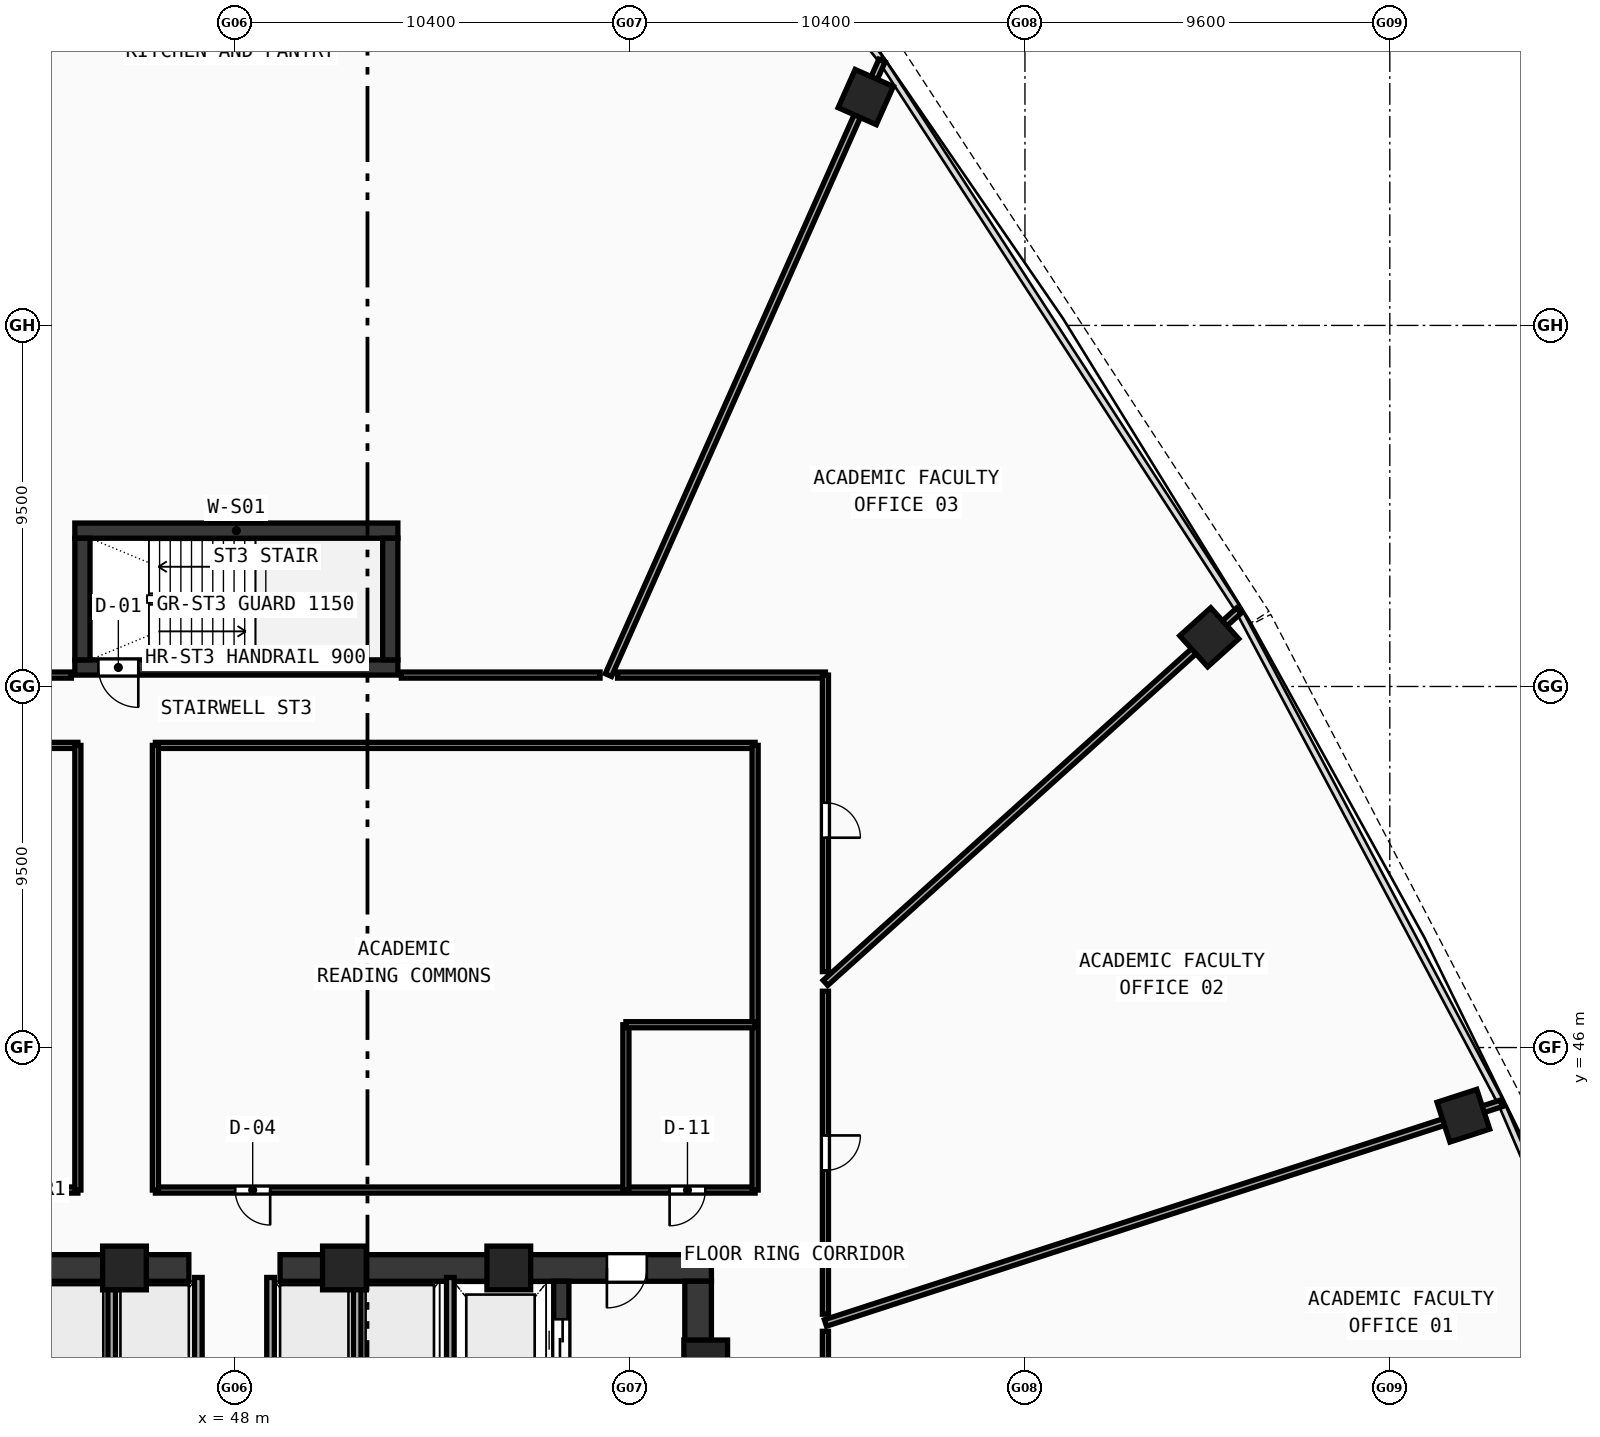
"""IFC4 building model, lengths in metres.
Left out: names, types, materials, properties, quantities, classifications, styles, units other than length and angle.
Written with IfcOpenShell. Run it as: python <this file> out.ifc"""

import sys

from ifc_helpers import new_model, si_unit, direction, frame, frame_2d, origin, origin_with_axes, origin_2d, place, context, subcontext, project, spatial, rectangle, hollow_rectangle, extrude, source, transform, mapped, element, fill, save


model = new_model("IFC4")
c1 = context("Model", 3, precision=1e-05, world=origin(), true_north=direction((0.0, 1.0)))
c2 = subcontext(c1, "Body", "Model", "MODEL_VIEW")
j1 = project(units=[si_unit("LENGTHUNIT", "METRE"), si_unit("PLANEANGLEUNIT", "RADIAN")], contexts=[c1])
p1 = place(None, origin())
s1 = spatial("IfcSite", under=j1, at=p1, CompositionType="ELEMENT")
p2 = place(p1, origin())
s2 = spatial("IfcBuilding", under=s1, at=p2, CompositionType="ELEMENT")
p3 = place(p2, frame((0.0, 0.0, 63.07)))
s3 = spatial("IfcBuildingStorey", under=s2, at=p3, CompositionType="ELEMENT", Elevation=63.07)
p4 = place(p3, frame((35.45, 40.2, 0.0), z_axis=(0.0, 0.0, 1.0), x_axis=(1.0, 0.0, 0.0)))
e1 = element("IfcWall", 1, at=p4, inside=s3, PredefinedType="SHEAR", context=c2, shape_type="SweptSolid", body=[
    extrude(rectangle(XDim=11.35, YDim=0.7, at=frame_2d((5.675, 0.0))), origin(), (0.0, 0.0, 1.0), 3.37),
])
p5 = place(p4, frame((1.7, 0.0, 0.0)))
e2 = element("IfcOpeningElement", 2, at=p5, cuts=e1, PredefinedType="OPENING", context=c2, shape_type="SweptSolid", body=[
    extrude(rectangle(XDim=1.05, YDim=2.1, at=frame_2d((0.525, 1.05))), frame((0.0, 0.36, 0.0), z_axis=(0.0, -1.0, 0.0), x_axis=(1.0, 0.0, 0.0)), (0.0, 0.0, 1.0), 0.72),
])
p6 = place(p3, frame((49.2, 40.2, 0.0), z_axis=(0.0, 0.0, 1.0), x_axis=(1.0, 0.0, 0.0)))
e3 = element("IfcWall", 3, at=p6, inside=s3, PredefinedType="SHEAR", context=c2, shape_type="SweptSolid", body=[
    extrude(rectangle(XDim=11.35, YDim=0.7, at=frame_2d((5.675, 0.0))), origin(), (0.0, 0.0, 1.0), 3.37),
])
p7 = place(p6, frame((8.6, 0.0, 0.0)))
e4 = element("IfcOpeningElement", 4, at=p7, cuts=e3, PredefinedType="OPENING", context=c2, shape_type="SweptSolid", body=[
    extrude(rectangle(XDim=1.05, YDim=2.1, at=frame_2d((0.525, 1.05))), frame((0.0, 0.36, 0.0), z_axis=(0.0, -1.0, 0.0), x_axis=(1.0, 0.0, 0.0)), (0.0, 0.0, 1.0), 0.72),
])
p8 = place(p3, frame((60.2, 27.85, 0.0), z_axis=(0.0, 0.0, 1.0), x_axis=(0.0, 1.0, 0.0)))
e5 = element("IfcWall", 5, at=p8, inside=s3, PredefinedType="SHEAR", context=c2, shape_type="SweptSolid", body=[
    extrude(rectangle(XDim=12.0, YDim=0.7, at=frame_2d((6.0, 0.0))), origin(), (0.0, 0.0, 1.0), 3.37),
])
p9 = place(p3, frame((56.6, 27.85, 0.0), z_axis=(0.0, 0.0, 1.0), x_axis=(0.0, 1.0, 0.0)))
e6 = element("IfcWall", 6, at=p9, inside=s3, PredefinedType="SHEAR", context=c2, shape_type="SweptSolid", body=[
    extrude(rectangle(XDim=12.0, YDim=0.4, at=frame_2d((6.0, 0.0))), origin(), (0.0, 0.0, 1.0), 3.37),
])
p10 = place(p9, frame((9.9, 0.0, 0.0)))
e7 = element("IfcOpeningElement", 7, at=p10, cuts=e6, PredefinedType="OPENING", context=c2, shape_type="SweptSolid", body=[
    extrude(rectangle(XDim=1.1, YDim=2.1, at=frame_2d((0.55, 1.05))), frame((0.0, 0.21, 0.0), z_axis=(0.0, -1.0, 0.0), x_axis=(1.0, 0.0, 0.0)), (0.0, 0.0, 1.0), 0.42),
])
p11 = place(p3, frame((43.8, 59.6, 0.0), z_axis=(0.0, 0.0, 1.0), x_axis=(1.0, 0.0, 0.0)))
e8 = element("IfcWall", 8, at=p11, inside=s3, PredefinedType="SHEAR", context=c2, shape_type="SweptSolid", body=[
    extrude(rectangle(XDim=8.5, YDim=0.4, at=frame_2d((4.25, 0.0))), origin(), (0.0, 0.0, 1.0), 3.37),
])
p12 = place(p3, frame((43.8, 56.0, 0.0), z_axis=(0.0, 0.0, 1.0), x_axis=(1.0, 0.0, 0.0)))
e9 = element("IfcWall", 9, at=p12, inside=s3, PredefinedType="SHEAR", context=c2, shape_type="SweptSolid", body=[
    extrude(rectangle(XDim=8.5, YDim=0.4, at=frame_2d((4.25, 0.0))), origin(), (0.0, 0.0, 1.0), 3.37),
])
p13 = place(p12, frame((0.62, 0.0, 0.0)))
e10 = element("IfcOpeningElement", 10, at=p13, cuts=e9, PredefinedType="OPENING", context=c2, shape_type="SweptSolid", body=[
    extrude(rectangle(XDim=1.05, YDim=2.1, at=frame_2d((0.525, 1.05))), frame((0.0, 0.21, 0.0), z_axis=(0.0, -1.0, 0.0), x_axis=(1.0, 0.0, 0.0)), (0.0, 0.0, 1.0), 0.42),
])
for number, where, z_axis, x_axis in (
    (11, (44.0, 56.2, 0.0), (0.0, 0.0, 1.0), (0.0, 1.0, 0.0)),
    (12, (52.1, 56.2, 0.0), (0.0, 0.0, 1.0), (0.0, 1.0, 0.0)),
):
    element("IfcWall", number, at=place(p3, frame(where, z_axis=z_axis, x_axis=x_axis)), inside=s3, PredefinedType="SHEAR", context=c2, shape_type="SweptSolid", body=[
        extrude(rectangle(XDim=3.2, YDim=0.4, at=frame_2d((1.6, 0.0))), origin(), (0.0, 0.0, 1.0), 3.37),
    ])
m1 = source(origin(), c2, "Body", "SweptSolid", [
    extrude(hollow_rectangle(XDim=1.15, YDim=1.15, WallThickness=0.048, at=origin_2d()), origin(), (0.0, 0.0, 1.0), 3.63),
])
for number, where, z_axis, x_axis in (
    (13, (60.4, 37.729, -0.26), (0.0, 0.0, 1.0), (1.0, 0.0, 0.0)),
    (14, (55.219, 40.2, -0.26), (0.0, 0.0, 1.0), (1.0, 0.0, 0.0)),
    (15, (50.894, 40.2, -0.26), (0.0, 0.0, 1.0), (1.0, 0.0, 0.0)),
    (16, (45.106, 40.2, -0.26), (0.0, 0.0, 1.0), (1.0, 0.0, 0.0)),
):
    element("IfcColumn", number, at=place(p3, frame(where, z_axis=z_axis, x_axis=x_axis)), inside=s3, PredefinedType="COLUMN", context=c2, shape_type="MappedRepresentation", body=[
        mapped(m1, transform((0.0, 0.0, 0.0), scale=1.0)),
    ])
m2 = source(origin(), c2, "Body", "SweptSolid", [
    extrude(hollow_rectangle(XDim=1.1, YDim=1.1, WallThickness=0.045, at=origin_2d()), origin(), (0.0, 0.0, 1.0), 3.63),
])
for number, where, z_axis, x_axis in (
    (17, (80.335, 44.206, -0.26), (0.0, 0.0, 1.0), (-0.309, 0.951, 0.0)),
    (18, (73.649, 56.794, -0.26), (0.0, 0.0, 1.0), (-0.669, 0.743, 0.0)),
    (19, (64.611, 71.009, -0.26), (0.0, 0.0, 1.0), (-0.914, 0.407, 0.0)),
):
    element("IfcColumn", number, at=place(p3, frame(where, z_axis=z_axis, x_axis=x_axis)), inside=s3, PredefinedType="COLUMN", context=c2, shape_type="MappedRepresentation", body=[
        mapped(m2, transform((0.0, 0.0, 0.0), scale=1.0)),
    ])
p14 = place(p3, frame((53.68, 36.65, 0.0), z_axis=(0.0, 0.0, 1.0), x_axis=(0.0, 1.0, 0.0)))
e20 = element("IfcWall", 20, at=p14, inside=s3, PredefinedType="SOLIDWALL", context=c2, shape_type="SweptSolid", body=[
    extrude(rectangle(XDim=3.3, YDim=0.2, at=frame_2d((1.65, 0.0))), origin(), (0.0, 0.0, 1.0), 3.37),
])
for number, where, z_axis, x_axis in (
    (21, (47.05, 37.32, 0.0), (0.0, 0.0, 1.0), (0.0, 1.0, 0.0)),
    (22, (48.95, 37.32, 0.0), (0.0, 0.0, 1.0), (0.0, 1.0, 0.0)),
    (23, (44.77, 37.32, 0.0), (0.0, 0.0, 1.0), (0.0, 1.0, 0.0)),
    (24, (51.23, 37.32, 0.0), (0.0, 0.0, 1.0), (0.0, 1.0, 0.0)),
):
    element("IfcWall", number, at=place(p3, frame(where, z_axis=z_axis, x_axis=x_axis)), inside=s3, PredefinedType="SOLIDWALL", context=c2, shape_type="SweptSolid", body=[
        extrude(rectangle(XDim=2.63, YDim=0.2, at=frame_2d((1.315, 0.0))), origin(), (0.0, 0.0, 1.0), 3.37),
    ])
p15 = place(p3, frame((34.95, 42.25, 0.0), z_axis=(0.0, 0.0, 1.0), x_axis=(1.0, 0.0, 0.0)))
e25 = element("IfcWall", 25, at=p15, inside=s3, PredefinedType="PARTITIONING", context=c2, shape_type="SweptSolid", body=[
    extrude(rectangle(XDim=8.93, YDim=0.16, at=frame_2d((4.465, 0.0))), origin(), (0.0, 0.0, 1.0), 2.67),
])
p16 = place(p15, frame((1.15, 0.0, 0.0)))
e26 = element("IfcOpeningElement", 26, at=p16, cuts=e25, PredefinedType="OPENING", context=c2, shape_type="SweptSolid", body=[
    extrude(rectangle(XDim=0.92, YDim=2.1, at=frame_2d((0.46, 1.05))), frame((0.0, 0.09, 0.0), z_axis=(0.0, -1.0, 0.0), x_axis=(1.0, 0.0, 0.0)), (0.0, 0.0, 1.0), 0.18),
])
p17 = place(p15, frame((4.65, 0.0, 0.0)))
e27 = element("IfcOpeningElement", 27, at=p17, cuts=e25, PredefinedType="OPENING", context=c2, shape_type="SweptSolid", body=[
    extrude(rectangle(XDim=0.92, YDim=2.1, at=frame_2d((0.46, 1.05))), frame((0.0, 0.09, 0.0), z_axis=(0.0, -1.0, 0.0), x_axis=(1.0, 0.0, 0.0)), (0.0, 0.0, 1.0), 0.18),
])
p18 = place(p3, frame((34.95, 53.95, 0.0), z_axis=(0.0, 0.0, 1.0), x_axis=(1.0, 0.0, 0.0)))
e28 = element("IfcWall", 28, at=p18, inside=s3, PredefinedType="PARTITIONING", context=c2, shape_type="SweptSolid", body=[
    extrude(rectangle(XDim=8.93, YDim=0.16, at=frame_2d((4.465, 0.0))), origin(), (0.0, 0.0, 1.0), 2.67),
])
p19 = place(p3, frame((43.88, 42.25, 0.0), z_axis=(0.0, 0.0, 1.0), x_axis=(0.0, 1.0, 0.0)))
e29 = element("IfcWall", 29, at=p19, inside=s3, PredefinedType="PARTITIONING", context=c2, shape_type="SweptSolid", body=[
    extrude(rectangle(XDim=11.7, YDim=0.16, at=frame_2d((5.85, 0.0))), origin(), (0.0, 0.0, 1.0), 2.67),
])
p20 = place(p3, frame((45.92, 42.25, 0.0), z_axis=(0.0, 0.0, 1.0), x_axis=(1.0, 0.0, 0.0)))
e30 = element("IfcWall", 30, at=p20, inside=s3, PredefinedType="PARTITIONING", context=c2, shape_type="SweptSolid", body=[
    extrude(rectangle(XDim=15.78, YDim=0.16, at=frame_2d((7.89, 0.0))), origin(), (0.0, 0.0, 1.0), 2.67),
])
p21 = place(p20, frame((2.1, 0.0, 0.0)))
e31 = element("IfcOpeningElement", 31, at=p21, cuts=e30, PredefinedType="OPENING", context=c2, shape_type="SweptSolid", body=[
    extrude(rectangle(XDim=0.92, YDim=2.1, at=frame_2d((0.46, 1.05))), frame((0.0, 0.09, 0.0), z_axis=(0.0, -1.0, 0.0), x_axis=(1.0, 0.0, 0.0)), (0.0, 0.0, 1.0), 0.18),
])
p22 = place(p20, frame((13.53, 0.0, 0.0)))
e32 = element("IfcOpeningElement", 32, at=p22, cuts=e30, PredefinedType="OPENING", context=c2, shape_type="SweptSolid", body=[
    extrude(rectangle(XDim=0.94, YDim=2.1, at=frame_2d((0.47, 1.05))), frame((0.0, 0.09, 0.0), z_axis=(0.0, -1.0, 0.0), x_axis=(1.0, 0.0, 0.0)), (0.0, 0.0, 1.0), 0.18),
])
p23 = place(p3, frame((45.92, 53.95, 0.0), z_axis=(0.0, 0.0, 1.0), x_axis=(1.0, 0.0, 0.0)))
e33 = element("IfcWall", 33, at=p23, inside=s3, PredefinedType="PARTITIONING", context=c2, shape_type="SweptSolid", body=[
    extrude(rectangle(XDim=15.78, YDim=0.16, at=frame_2d((7.89, 0.0))), origin(), (0.0, 0.0, 1.0), 2.67),
])
p24 = place(p3, frame((45.92, 42.25, 0.0), z_axis=(0.0, 0.0, 1.0), x_axis=(0.0, 1.0, 0.0)))
e34 = element("IfcWall", 34, at=p24, inside=s3, PredefinedType="PARTITIONING", context=c2, shape_type="SweptSolid", body=[
    extrude(rectangle(XDim=11.7, YDim=0.16, at=frame_2d((5.85, 0.0))), origin(), (0.0, 0.0, 1.0), 2.97),
])
p25 = place(p3, frame((61.7, 42.25, 0.0), z_axis=(0.0, 0.0, 1.0), x_axis=(0.0, 1.0, 0.0)))
e35 = element("IfcWall", 35, at=p25, inside=s3, PredefinedType="PARTITIONING", context=c2, shape_type="SweptSolid", body=[
    extrude(rectangle(XDim=11.7, YDim=0.16, at=frame_2d((5.85, 0.0))), origin(), (0.0, 0.0, 1.0), 2.67),
])
p26 = place(p3, frame((58.3, 42.25, 0.0), z_axis=(0.0, 0.0, 1.0), x_axis=(0.0, 1.0, 0.0)))
e36 = element("IfcWall", 36, at=p26, inside=s3, PredefinedType="PARTITIONING", context=c2, shape_type="SweptSolid", body=[
    extrude(rectangle(XDim=4.35, YDim=0.16, at=frame_2d((2.175, 0.0))), origin(), (0.0, 0.0, 1.0), 2.67),
])
p27 = place(p3, frame((58.3, 46.6, 0.0), z_axis=(0.0, 0.0, 1.0), x_axis=(1.0, 0.0, 0.0)))
e37 = element("IfcWall", 37, at=p27, inside=s3, PredefinedType="PARTITIONING", context=c2, shape_type="SweptSolid", body=[
    extrude(rectangle(XDim=3.4, YDim=0.16, at=frame_2d((1.7, 0.0))), origin(), (0.0, 0.0, 1.0), 2.97),
])
p28 = place(p3, frame((63.55, 38.752, 0.0), z_axis=(0.0, 0.0, 1.0), x_axis=(0.951053160417, 0.309027322514, 0.0)))
e38 = element("IfcWall", 38, at=p28, inside=s3, PredefinedType="PARTITIONING", context=c2, shape_type="SweptSolid", body=[
    extrude(rectangle(XDim=18.699, YDim=0.18, at=frame_2d((9.35, 0.0))), origin(), (0.0, 0.0, 1.0), 2.67),
])
p29 = place(p3, frame((63.55, 47.701, 0.0), z_axis=(0.0, 0.0, 1.0), x_axis=(0.743144860423, 0.669130567547, 0.0)))
e39 = element("IfcWall", 39, at=p29, inside=s3, PredefinedType="PARTITIONING", context=c2, shape_type="SweptSolid", body=[
    extrude(rectangle(XDim=14.639, YDim=0.18, at=frame_2d((7.319, 0.0))), origin(), (0.0, 0.0, 1.0), 2.67),
])
p30 = place(p3, frame((57.84, 55.8, 0.0), z_axis=(0.0, 0.0, 1.0), x_axis=(0.406732277088, 0.913547401493, 0.0)))
e40 = element("IfcWall", 40, at=p30, inside=s3, PredefinedType="PARTITIONING", context=c2, shape_type="SweptSolid", body=[
    extrude(rectangle(XDim=17.698, YDim=0.18, at=frame_2d((8.849, 0.0))), origin(), (0.0, 0.0, 1.0), 2.67),
])
p31 = place(p3, frame((33.1, 55.8, 0.0), z_axis=(0.0, 0.0, 1.0), x_axis=(1.0, 0.0, 0.0)))
e41 = element("IfcWall", 41, at=p31, inside=s3, PredefinedType="PARTITIONING", context=c2, shape_type="SweptSolid", body=[
    extrude(rectangle(XDim=10.609, YDim=0.16, at=frame_2d((5.304, 0.0))), origin(), (0.0, 0.0, 1.0), 2.67),
])
p32 = place(p31, frame((4.635, 0.0, 0.0)))
e42 = element("IfcOpeningElement", 42, at=p32, cuts=e41, PredefinedType="OPENING", context=c2, shape_type="SweptSolid", body=[
    extrude(rectangle(XDim=0.95, YDim=2.1, at=frame_2d((0.475, 1.05))), frame((0.0, 0.09, 0.0), z_axis=(0.0, -1.0, 0.0), x_axis=(1.0, 0.0, 0.0)), (0.0, 0.0, 1.0), 0.18),
])
p33 = place(p3, frame((52.391, 55.8, 0.0), z_axis=(0.0, 0.0, 1.0), x_axis=(1.0, 0.0, 0.0)))
e43 = element("IfcWall", 43, at=p33, inside=s3, PredefinedType="PARTITIONING", context=c2, shape_type="SweptSolid", body=[
    extrude(rectangle(XDim=5.229, YDim=0.16, at=frame_2d((2.614, 0.0))), origin(), (0.0, 0.0, 1.0), 2.67),
])
p34 = place(p3, frame((58.08, 55.8, 0.0), z_axis=(0.0, 0.0, 1.0), x_axis=(1.0, 0.0, 0.0)))
e44 = element("IfcWall", 44, at=p34, inside=s3, PredefinedType="PARTITIONING", context=c2, shape_type="SweptSolid", body=[
    extrude(rectangle(XDim=5.47, YDim=0.16, at=frame_2d((2.735, 0.0))), origin(), (0.0, 0.0, 1.0), 3.37),
])
p35 = place(p3, frame((63.55, 55.8, 0.0), z_axis=(0.0, 0.0, 1.0), x_axis=(0.0, -1.0, 0.0)))
e45 = element("IfcWall", 45, at=p35, inside=s3, PredefinedType="PARTITIONING", context=c2, shape_type="SweptSolid", body=[
    extrude(rectangle(XDim=7.803, YDim=0.16, at=frame_2d((3.901, 0.0))), origin(), (0.0, 0.0, 1.0), 3.37),
])
p36 = place(p35, frame((3.359, 0.0, 0.0)))
e46 = element("IfcOpeningElement", 46, at=p36, cuts=e45, PredefinedType="OPENING", context=c2, shape_type="SweptSolid", body=[
    extrude(rectangle(XDim=0.92, YDim=2.1, at=frame_2d((0.46, 1.05))), frame((0.0, 0.09, 0.0), z_axis=(0.0, -1.0, 0.0), x_axis=(1.0, 0.0, 0.0)), (0.0, 0.0, 1.0), 0.18),
])
p37 = place(p3, frame((63.55, 47.482, 0.0), z_axis=(0.0, 0.0, 1.0), x_axis=(0.0, -1.0, 0.0)))
e47 = element("IfcWall", 47, at=p37, inside=s3, PredefinedType="PARTITIONING", context=c2, shape_type="SweptSolid", body=[
    extrude(rectangle(XDim=8.498, YDim=0.16, at=frame_2d((4.249, 0.0))), origin(), (0.0, 0.0, 1.0), 2.67),
])
p38 = place(p37, frame((3.795, 0.0, 0.0)))
e48 = element("IfcOpeningElement", 48, at=p38, cuts=e47, PredefinedType="OPENING", context=c2, shape_type="SweptSolid", body=[
    extrude(rectangle(XDim=0.92, YDim=2.1, at=frame_2d((0.46, 1.05))), frame((0.0, 0.09, 0.0), z_axis=(0.0, -1.0, 0.0), x_axis=(1.0, 0.0, 0.0)), (0.0, 0.0, 1.0), 0.18),
])
p39 = place(p3, frame((63.55, 38.533, 0.0), z_axis=(0.0, 0.0, 1.0), x_axis=(0.0, -1.0, 0.0)))
e49 = element("IfcWall", 49, at=p39, inside=s3, PredefinedType="PARTITIONING", context=c2, shape_type="SweptSolid", body=[
    extrude(rectangle(XDim=4.07, YDim=0.16, at=frame_2d((2.035, 0.0))), origin(), (0.0, 0.0, 1.0), 3.37),
])
p40 = place(p39, frame((1.575, 0.0, 0.0)))
e50 = element("IfcOpeningElement", 50, at=p40, cuts=e49, PredefinedType="OPENING", context=c2, shape_type="SweptSolid", body=[
    extrude(rectangle(XDim=0.92, YDim=2.1, at=frame_2d((0.46, 1.05))), frame((0.0, 0.09, 0.0), z_axis=(0.0, -1.0, 0.0), x_axis=(1.0, 0.0, 0.0)), (0.0, 0.0, 1.0), 0.18),
])
m3 = source(origin(), c2, "Body", "SweptSolid", [
    extrude(rectangle(XDim=1.05, YDim=2.1, at=frame_2d((0.525, 1.05))), frame((0.0, 0.025, 0.0), z_axis=(0.0, -1.0, 0.0), x_axis=(1.0, 0.0, 0.0)), (0.0, 0.0, 1.0), 0.05),
])
p41 = place(p7, frame((1.05, 0.0, 0.0), z_axis=(0.0, 0.0, 1.0), x_axis=(-1.0, 0.0, 0.0)))
e51 = element("IfcDoor", 51, at=p41, inside=s3, OperationType="SINGLE_SWING_RIGHT", PredefinedType="DOOR", context=c2, shape_type="MappedRepresentation", body=[
    mapped(m3, transform((0.0, 0.0, 0.0), scale=1.0)),
])
fill(e4, e51)
m4 = source(origin(), c2, "Body", "SweptSolid", [
    extrude(rectangle(XDim=1.1, YDim=2.1, at=frame_2d((0.55, 1.05))), frame((0.0, 0.025, 0.0), z_axis=(0.0, -1.0, 0.0), x_axis=(1.0, 0.0, 0.0)), (0.0, 0.0, 1.0), 0.05),
])
p42 = place(p10, origin_with_axes())
e52 = element("IfcDoor", 52, at=p42, inside=s3, OperationType="DOUBLE_DOOR_SLIDING", PredefinedType="DOOR", context=c2, shape_type="MappedRepresentation", body=[
    mapped(m4, transform((0.0, 0.0, 0.0), scale=1.0)),
])
fill(e7, e52)
p43 = place(p13, frame((1.05, 0.0, 0.0), z_axis=(0.0, 0.0, 1.0), x_axis=(-1.0, 0.0, 0.0)))
e53 = element("IfcDoor", 53, at=p43, inside=s3, OperationType="SINGLE_SWING_LEFT", PredefinedType="DOOR", context=c2, shape_type="MappedRepresentation", body=[
    mapped(m3, transform((0.0, 0.0, 0.0), scale=1.0)),
])
fill(e10, e53)
m5 = source(origin(), c2, "Body", "SweptSolid", [
    extrude(rectangle(XDim=0.92, YDim=2.1, at=frame_2d((0.46, 1.05))), frame((0.0, 0.025, 0.0), z_axis=(0.0, -1.0, 0.0), x_axis=(1.0, 0.0, 0.0)), (0.0, 0.0, 1.0), 0.05),
])
p44 = place(p21, frame((0.92, 0.0, 0.0), z_axis=(0.0, 0.0, 1.0), x_axis=(-1.0, 0.0, 0.0)))
e54 = element("IfcDoor", 54, at=p44, inside=s3, OperationType="SINGLE_SWING_LEFT", PredefinedType="DOOR", context=c2, shape_type="MappedRepresentation", body=[
    mapped(m5, transform((0.0, 0.0, 0.0), scale=1.0)),
])
fill(e31, e54)
m6 = source(origin(), c2, "Body", "SweptSolid", [
    extrude(rectangle(XDim=0.94, YDim=2.1, at=frame_2d((0.47, 1.05))), frame((0.0, 0.025, 0.0), z_axis=(0.0, -1.0, 0.0), x_axis=(1.0, 0.0, 0.0)), (0.0, 0.0, 1.0), 0.05),
])
p45 = place(p22, frame((0.94, 0.0, 0.0), z_axis=(0.0, 0.0, 1.0), x_axis=(-1.0, 0.0, 0.0)))
e55 = element("IfcDoor", 55, at=p45, inside=s3, OperationType="SINGLE_SWING_RIGHT", PredefinedType="DOOR", context=c2, shape_type="MappedRepresentation", body=[
    mapped(m6, transform((0.0, 0.0, 0.0), scale=1.0)),
])
fill(e32, e55)
p46 = place(p38, origin_with_axes())
e56 = element("IfcDoor", 56, at=p46, inside=s3, OperationType="SINGLE_SWING_LEFT", PredefinedType="DOOR", context=c2, shape_type="MappedRepresentation", body=[
    mapped(m5, transform((0.0, 0.0, 0.0), scale=1.0)),
])
fill(e48, e56)
p47 = place(p36, origin_with_axes())
e57 = element("IfcDoor", 57, at=p47, inside=s3, OperationType="SINGLE_SWING_RIGHT", PredefinedType="DOOR", context=c2, shape_type="MappedRepresentation", body=[
    mapped(m5, transform((0.0, 0.0, 0.0), scale=1.0)),
])
fill(e46, e57)
save(model, sys.argv[1])
